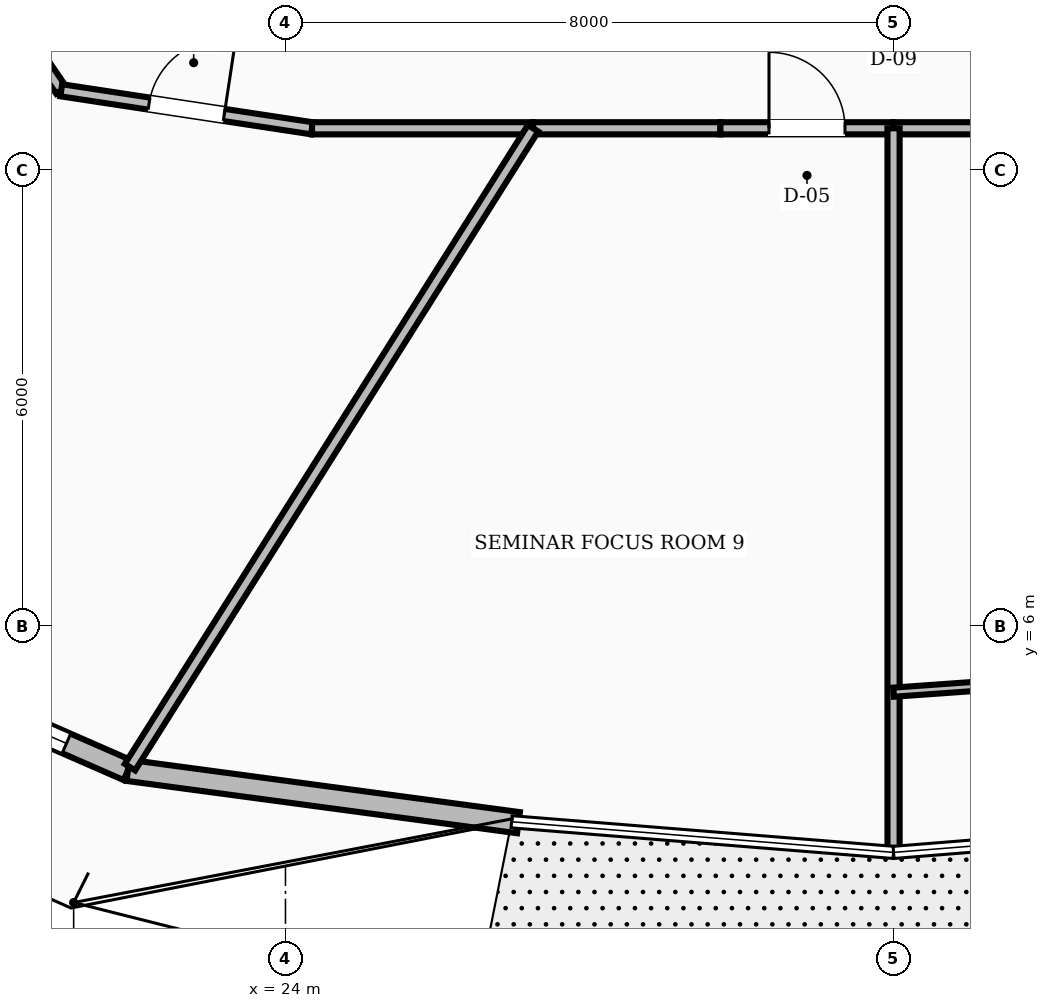
"""IFC4 building model, lengths in metres.
Left out: names, types, materials, properties, quantities, classifications, styles, units other than length and angle.
Written with IfcOpenShell. Run it as: python <this file> out.ifc"""

import sys

from ifc_helpers import new_model, si_unit, direction, frame, frame_2d, origin, place, context, subcontext, project, spatial, rectangle, extrude, element, fill, save


model = new_model("IFC4")
c1 = context("Model", 3, precision=1e-05, world=origin(), true_north=direction((0.0, 1.0)))
c2 = subcontext(c1, "Body", "Model", "MODEL_VIEW")
j1 = project(units=[si_unit("LENGTHUNIT", "METRE"), si_unit("PLANEANGLEUNIT", "RADIAN")], contexts=[c1])
p1 = place(None, origin())
s1 = spatial("IfcSite", under=j1, at=p1, CompositionType="ELEMENT")
p2 = place(p1, origin())
s2 = spatial("IfcBuilding", under=s1, at=p2, CompositionType="ELEMENT")
p3 = place(p2, frame((0.0, 0.0, 153.2)))
s3 = spatial("IfcBuildingStorey", under=s2, at=p3, CompositionType="ELEMENT", Elevation=153.2)
p4 = place(p3, frame((17.377, 6.093, 0.0), z_axis=(0.0, 0.0, 1.0), x_axis=(0.916213737075, -0.400689890058, 0.0)))
e1 = element("IfcWall", 1, at=p4, inside=s3, PredefinedType="STANDARD", context=c2, shape_type="SweptSolid", body=[
    extrude(rectangle(XDim=4.966, YDim=0.28, at=frame_2d((2.483, 0.0))), origin(), (0.0, 0.0, 1.0), 2.82),
])
p5 = place(p4, frame((0.883, 0.0, 0.8)))
e2 = element("IfcOpeningElement", 2, at=p5, cuts=e1, PredefinedType="OPENING", context=c2, shape_type="SweptSolid", body=[
    extrude(rectangle(XDim=3.2, YDim=1.65, at=frame_2d((1.6, 0.825))), frame((0.0, 0.15, 0.0), z_axis=(0.0, -1.0, 0.0), x_axis=(1.0, 0.0, 0.0)), (0.0, 0.0, 1.0), 0.3),
])
p6 = place(p3, frame((21.927, 4.103, 0.0), z_axis=(0.0, 0.0, 1.0), x_axis=(0.991142142186, -0.132805323623, 0.0)))
e3 = element("IfcWall", 3, at=p6, inside=s3, PredefinedType="STANDARD", context=c2, shape_type="SweptSolid", body=[
    extrude(rectangle(XDim=5.184, YDim=0.28, at=frame_2d((2.592, 0.0))), origin(), (0.0, 0.0, 1.0), 2.82),
])
p7 = place(p3, frame((19.35, 15.548, 0.0), z_axis=(0.0, 0.0, 1.0), x_axis=(0.562674669208, -0.826678423955, 0.0)))
e4 = element("IfcWall", 4, at=p7, inside=s3, PredefinedType="SOLIDWALL", context=c2, shape_type="SweptSolid", body=[
    extrude(rectangle(XDim=3.021, YDim=0.16, at=frame_2d((1.511, 0.0))), origin(), (0.0, 0.0, 1.0), 2.8),
])
p8 = place(p3, frame((21.05, 13.05, 0.0), z_axis=(0.0, 0.0, 1.0), x_axis=(0.988710906508, -0.149835721217, 0.0)))
e5 = element("IfcWall", 5, at=p8, inside=s3, PredefinedType="SOLIDWALL", context=c2, shape_type="SweptSolid", body=[
    extrude(rectangle(XDim=3.337, YDim=0.16, at=frame_2d((1.668, 0.0))), origin(), (0.0, 0.0, 1.0), 2.8),
])
p9 = place(p8, frame((1.168, 0.0, 0.0)))
e6 = element("IfcOpeningElement", 6, at=p9, cuts=e5, PredefinedType="OPENING", context=c2, shape_type="SweptSolid", body=[
    extrude(rectangle(XDim=1.0, YDim=2.1, at=frame_2d((0.5, 1.05))), frame((0.0, 0.09, 0.0), z_axis=(0.0, -1.0, 0.0), x_axis=(1.0, 0.0, 0.0)), (0.0, 0.0, 1.0), 0.18),
])
p10 = place(p3, frame((24.349, 12.55, 0.0), z_axis=(0.0, 0.0, 1.0), x_axis=(1.0, 0.0, 0.0)))
e7 = element("IfcWall", 7, at=p10, inside=s3, PredefinedType="SOLIDWALL", context=c2, shape_type="SweptSolid", body=[
    extrude(rectangle(XDim=2.908, YDim=0.16, at=frame_2d((1.454, 0.0))), origin(), (0.0, 0.0, 1.0), 2.8),
])
p11 = place(p3, frame((27.257, 12.55, 0.0), z_axis=(0.0, 0.0, 1.0), x_axis=(1.0, 0.0, 0.0)))
e8 = element("IfcWall", 8, at=p11, inside=s3, PredefinedType="SOLIDWALL", context=c2, shape_type="SweptSolid", body=[
    extrude(rectangle(XDim=2.465, YDim=0.16, at=frame_2d((1.232, 0.0))), origin(), (0.0, 0.0, 1.0), 2.8),
])
p12 = place(p3, frame((29.722, 12.55, 0.0), z_axis=(0.0, 0.0, 1.0), x_axis=(1.0, 0.0, 0.0)))
e9 = element("IfcWall", 9, at=p12, inside=s3, PredefinedType="SOLIDWALL", context=c2, shape_type="SweptSolid", body=[
    extrude(rectangle(XDim=2.278, YDim=0.16, at=frame_2d((1.139, 0.0))), origin(), (0.0, 0.0, 1.0), 2.8),
])
p13 = place(p12, frame((0.639, 0.0, 0.0)))
e10 = element("IfcOpeningElement", 10, at=p13, cuts=e9, PredefinedType="OPENING", context=c2, shape_type="SweptSolid", body=[
    extrude(rectangle(XDim=1.0, YDim=2.1, at=frame_2d((0.5, 1.05))), frame((0.0, 0.09, 0.0), z_axis=(0.0, -1.0, 0.0), x_axis=(1.0, 0.0, 0.0)), (0.0, 0.0, 1.0), 0.18),
])
p14 = place(p3, frame((32.0, 12.55, 0.0), z_axis=(0.0, 0.0, 1.0), x_axis=(1.0, 0.0, 0.0)))
e11 = element("IfcWall", 11, at=p14, inside=s3, PredefinedType="SOLIDWALL", context=c2, shape_type="SweptSolid", body=[
    extrude(rectangle(XDim=2.278, YDim=0.16, at=frame_2d((1.139, 0.0))), origin(), (0.0, 0.0, 1.0), 2.8),
])
p15 = place(p3, frame((27.257, 12.55, 0.0), z_axis=(0.0, 0.0, 1.0), x_axis=(-0.53362877713, -0.84571882338, 0.0)))
e12 = element("IfcWall", 12, at=p15, inside=s3, PredefinedType="SOLIDWALL", context=c2, shape_type="SweptSolid", body=[
    extrude(rectangle(XDim=9.938, YDim=0.16, at=frame_2d((4.969, 0.0))), origin(), (0.0, 0.0, 1.0), 2.8),
])
p16 = place(p3, frame((32.0, 12.55, 0.0), z_axis=(0.0, 0.0, 1.0), x_axis=(0.0, -1.0, 0.0)))
e13 = element("IfcWall", 13, at=p16, inside=s3, PredefinedType="SOLIDWALL", context=c2, shape_type="SweptSolid", body=[
    extrude(rectangle(XDim=9.477, YDim=0.16, at=frame_2d((4.738, 0.0))), origin(), (0.0, 0.0, 1.0), 2.8),
])
p17 = place(p3, frame((32.0, 5.132, 0.0), z_axis=(0.0, 0.0, 1.0), x_axis=(0.997483822836, 0.070894450987, 0.0)))
e14 = element("IfcWall", 14, at=p17, inside=s3, PredefinedType="PARTITIONING", context=c2, shape_type="SweptSolid", body=[
    extrude(rectangle(XDim=4.429, YDim=0.12, at=frame_2d((2.214, 0.0))), origin(), (0.0, 0.0, 1.0), 2.8),
])
p18 = place(p17, frame((1.739, 0.0, 0.0)))
e15 = element("IfcOpeningElement", 15, at=p18, cuts=e14, PredefinedType="OPENING", context=c2, shape_type="SweptSolid", body=[
    extrude(rectangle(XDim=0.95, YDim=2.1, at=frame_2d((0.475, 1.05))), frame((0.0, 0.07, 0.0), z_axis=(0.0, -1.0, 0.0), x_axis=(1.0, 0.0, 0.0)), (0.0, 0.0, 1.0), 0.14),
])
p19 = place(p5, origin())
e16 = element("IfcWindow", 16, at=p19, inside=s3, PartitioningType="SINGLE_PANEL", PredefinedType="WINDOW", context=c2, shape_type="SweptSolid", body=[
    extrude(rectangle(XDim=3.2, YDim=1.65, at=frame_2d((1.6, 0.825))), frame((0.0, 0.03, 0.0), z_axis=(0.0, -1.0, 0.0), x_axis=(1.0, 0.0, 0.0)), (0.0, 0.0, 1.0), 0.06),
])
fill(e2, e16)
p20 = place(p9, origin())
e17 = element("IfcDoor", 17, at=p20, inside=s3, OperationType="SINGLE_SWING_RIGHT", PredefinedType="DOOR", context=c2, shape_type="SweptSolid", body=[
    extrude(rectangle(XDim=1.0, YDim=2.1, at=frame_2d((0.5, 1.05))), frame((0.0, 0.025, 0.0), z_axis=(0.0, -1.0, 0.0), x_axis=(1.0, 0.0, 0.0)), (0.0, 0.0, 1.0), 0.05),
])
fill(e6, e17)
p21 = place(p13, origin())
e18 = element("IfcDoor", 18, at=p21, inside=s3, OperationType="SINGLE_SWING_LEFT", PredefinedType="DOOR", context=c2, shape_type="SweptSolid", body=[
    extrude(rectangle(XDim=1.0, YDim=2.1, at=frame_2d((0.5, 1.05))), frame((0.0, 0.025, 0.0), z_axis=(0.0, -1.0, 0.0), x_axis=(1.0, 0.0, 0.0)), (0.0, 0.0, 1.0), 0.05),
])
fill(e10, e18)
save(model, sys.argv[1])
